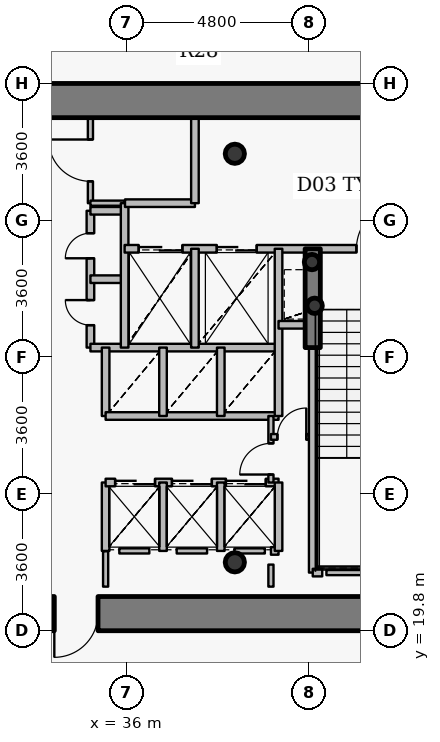
"""IFC4 building model, lengths in metres.
Left out: names, types, materials, properties, quantities, classifications, styles, units other than length and angle.
Written with IfcOpenShell. Run it as: python <this file> out.ifc"""

import sys

from ifc_helpers import new_model, si_unit, direction, frame, frame_2d, origin, origin_2d, place, context, subcontext, project, spatial, rectangle, hollow_circle, extrude, source, transform, mapped, element, fill, save


model = new_model("IFC4")
c1 = context("Model", 3, precision=1e-05, world=origin(), true_north=direction((0.0, 1.0)))
c2 = subcontext(c1, "Body", "Model", "MODEL_VIEW")
j1 = project(units=[si_unit("LENGTHUNIT", "METRE"), si_unit("PLANEANGLEUNIT", "RADIAN")], contexts=[c1])
p1 = place(None, origin())
s1 = spatial("IfcSite", under=j1, at=p1, CompositionType="ELEMENT")
p2 = place(p1, origin())
s2 = spatial("IfcBuilding", under=s1, at=p2, CompositionType="ELEMENT")
p3 = place(p2, frame((0.0, 0.0, 66.0)))
s3 = spatial("IfcBuildingStorey", under=s2, at=p3, CompositionType="ELEMENT", Elevation=66.0)
for number, where, z_axis, x_axis in (
    (1, (38.85, 21.6, 0.0), (0.0, 0.0, 1.0), (1.0, 0.0, 0.0)),
    (2, (38.85, 32.35, 0.0), (0.0, 0.0, 1.0), (1.0, 0.0, 0.0)),
):
    element("IfcColumn", number, at=place(p3, frame(where, z_axis=z_axis, x_axis=x_axis)), inside=s3, PredefinedType="COLUMN", context=c2, shape_type="SweptSolid", body=[
        extrude(hollow_circle(Radius=0.254, WallThickness=0.02, at=origin_2d()), origin(), (0.0, 0.0, 1.0), 4.2),
    ])
for number, where, z_axis, x_axis in (
    (3, (40.95, 28.35, 0.0), (0.0, 0.0, 1.0), (1.0, 0.0, 0.0)),
    (4, (40.88, 29.5, 0.0), (0.0, 0.0, 1.0), (1.0, 0.0, 0.0)),
):
    element("IfcColumn", number, at=place(p3, frame(where, z_axis=z_axis, x_axis=x_axis)), inside=s3, PredefinedType="COLUMN", context=c2, shape_type="SweptSolid", body=[
        extrude(hollow_circle(Radius=0.203, WallThickness=0.016, at=origin_2d()), origin(), (0.0, 0.0, 1.0), 4.2),
    ])
p4 = place(p3, frame((26.75, 33.75, 0.0), z_axis=(0.0, 0.0, 1.0), x_axis=(1.0, 0.0, 0.0)))
e5 = element("IfcWall", 5, at=p4, inside=s3, PredefinedType="SHEAR", context=c2, shape_type="SweptSolid", body=[
    extrude(rectangle(XDim=18.5, YDim=0.9, at=frame_2d((9.25, 0.0))), origin(), (0.0, 0.0, 1.0), 3.4),
])
p5 = place(p3, frame((45.25, 20.25, 0.0), z_axis=(0.0, 0.0, 1.0), x_axis=(-1.0, 0.0, 0.0)))
e6 = element("IfcWall", 6, at=p5, inside=s3, PredefinedType="SHEAR", context=c2, shape_type="SweptSolid", body=[
    extrude(rectangle(XDim=18.5, YDim=0.9, at=frame_2d((9.25, 0.0))), origin(), (0.0, 0.0, 1.0), 3.4),
])
p6 = place(p5, frame((10.0, 0.0, 0.0)))
e7 = element("IfcOpeningElement", 7, at=p6, cuts=e6, PredefinedType="OPENING", context=c2, shape_type="SweptSolid", body=[
    extrude(rectangle(XDim=1.15, YDim=2.15, at=origin_2d()), frame((0.575, 0.46, 1.075), z_axis=(0.0, -1.0, 0.0), x_axis=(1.0, 0.0, 0.0)), (0.0, 0.0, 1.0), 0.92),
])
p7 = place(p3, frame((40.9, 27.25, 0.0), z_axis=(0.0, 0.0, 1.0), x_axis=(0.0, 1.0, 0.0)))
e8 = element("IfcWall", 8, at=p7, inside=s3, PredefinedType="SHEAR", context=c2, shape_type="SweptSolid", body=[
    extrude(rectangle(XDim=2.6, YDim=0.4, at=frame_2d((1.3, 0.0))), origin(), (0.0, 0.0, 1.0), 3.55),
])
p8 = place(p3, frame((35.05, 27.25, 0.0), z_axis=(0.0, 0.0, 1.0), x_axis=(0.0, 1.0, 0.0)))
e9 = element("IfcWall", 9, at=p8, inside=s3, PredefinedType="PARTITIONING", context=c2, shape_type="SweptSolid", body=[
    extrude(rectangle(XDim=3.6, YDim=0.2, at=frame_2d((1.8, 0.0))), origin(), (0.0, 0.0, 1.0), 3.95),
])
p9 = place(p8, frame((0.59, 0.0, 0.0)))
e10 = element("IfcOpeningElement", 10, at=p9, cuts=e9, PredefinedType="OPENING", context=c2, shape_type="SweptSolid", body=[
    extrude(rectangle(XDim=0.66, YDim=2.05, at=origin_2d()), frame((0.33, 0.11, 1.025), z_axis=(0.0, -1.0, 0.0), x_axis=(1.0, 0.0, 0.0)), (0.0, 0.0, 1.0), 0.22),
])
p10 = place(p8, frame((2.35, 0.0, 0.0)))
e11 = element("IfcOpeningElement", 11, at=p10, cuts=e9, PredefinedType="OPENING", context=c2, shape_type="SweptSolid", body=[
    extrude(rectangle(XDim=0.66, YDim=2.05, at=origin_2d()), frame((0.33, 0.11, 1.025), z_axis=(0.0, -1.0, 0.0), x_axis=(1.0, 0.0, 0.0)), (0.0, 0.0, 1.0), 0.22),
])
p11 = place(p3, frame((35.05, 27.25, 0.0), z_axis=(0.0, 0.0, 1.0), x_axis=(1.0, 0.0, 0.0)))
e12 = element("IfcWall", 12, at=p11, inside=s3, PredefinedType="PARTITIONING", context=c2, shape_type="SweptSolid", body=[
    extrude(rectangle(XDim=4.95, YDim=0.2, at=frame_2d((2.475, 0.0))), origin(), (0.0, 0.0, 1.0), 3.535),
])
for number, where, z_axis, x_axis in (
    (13, (35.05, 29.05, 0.0), (0.0, 0.0, 1.0), (1.0, 0.0, 0.0)),
    (14, (35.05, 30.85, 0.0), (0.0, 0.0, 1.0), (1.0, 0.0, 0.0)),
):
    element("IfcWall", number, at=place(p3, frame(where, z_axis=z_axis, x_axis=x_axis)), inside=s3, PredefinedType="PARTITIONING", context=c2, shape_type="SweptSolid", body=[
        extrude(rectangle(XDim=0.9, YDim=0.2, at=frame_2d((0.45, 0.0))), origin(), (0.0, 0.0, 1.0), 3.95),
    ])
p12 = place(p3, frame((35.05, 31.05, 0.0), z_axis=(0.0, 0.0, 1.0), x_axis=(0.0, 1.0, 0.0)))
e15 = element("IfcWall", 15, at=p12, inside=s3, PredefinedType="PARTITIONING", context=c2, shape_type="SweptSolid", body=[
    extrude(rectangle(XDim=2.25, YDim=0.135, at=frame_2d((1.125, 0.0))), origin(), (0.0, 0.0, 1.0), 3.535),
])
p13 = place(p12, frame((0.575, 0.0, 0.0)))
e16 = element("IfcOpeningElement", 16, at=p13, cuts=e15, PredefinedType="OPENING", context=c2, shape_type="SweptSolid", body=[
    extrude(rectangle(XDim=1.1, YDim=2.15, at=origin_2d()), frame((0.55, 0.078, 1.075), z_axis=(0.0, -1.0, 0.0), x_axis=(1.0, 0.0, 0.0)), (0.0, 0.0, 1.0), 0.155),
])
p14 = place(p3, frame((35.05, 31.05, 0.0), z_axis=(0.0, 0.0, 1.0), x_axis=(1.0, 0.0, 0.0)))
e17 = element("IfcWall", 17, at=p14, inside=s3, PredefinedType="PARTITIONING", context=c2, shape_type="SweptSolid", body=[
    extrude(rectangle(XDim=0.9, YDim=0.135, at=frame_2d((0.45, 0.0))), origin(), (0.0, 0.0, 1.0), 3.95),
])
p15 = place(p3, frame((35.45, 21.9, 0.0), z_axis=(0.0, 0.0, 1.0), x_axis=(0.0, 1.0, 0.0)))
e18 = element("IfcWall", 18, at=p15, inside=s3, PredefinedType="PARTITIONING", context=c2, shape_type="SweptSolid", body=[
    extrude(rectangle(XDim=1.8, YDim=0.2, at=frame_2d((0.9, 0.0))), origin(), (0.0, 0.0, 1.0), 3.95),
])
p16 = place(p3, frame((35.45, 23.7, 0.0), z_axis=(0.0, 0.0, 1.0), x_axis=(1.0, 0.0, 0.0)))
e19 = element("IfcWall", 19, at=p16, inside=s3, PredefinedType="PARTITIONING", context=c2, shape_type="SweptSolid", body=[
    extrude(rectangle(XDim=4.55, YDim=0.2, at=frame_2d((2.275, 0.0))), origin(), (0.0, 0.0, 1.0), 3.535),
])
p17 = place(p16, frame((0.25, 0.0, 0.0)))
e20 = element("IfcOpeningElement", 20, at=p17, cuts=e19, PredefinedType="OPENING", context=c2, shape_type="SweptSolid", body=[
    extrude(rectangle(XDim=1.05, YDim=2.15, at=origin_2d()), frame((0.525, 0.11, 1.075), z_axis=(0.0, -1.0, 0.0), x_axis=(1.0, 0.0, 0.0)), (0.0, 0.0, 1.0), 0.22),
])
p18 = place(p16, frame((1.745, 0.0, 0.0)))
e21 = element("IfcOpeningElement", 21, at=p18, cuts=e19, PredefinedType="OPENING", context=c2, shape_type="SweptSolid", body=[
    extrude(rectangle(XDim=1.05, YDim=2.15, at=origin_2d()), frame((0.525, 0.11, 1.075), z_axis=(0.0, -1.0, 0.0), x_axis=(1.0, 0.0, 0.0)), (0.0, 0.0, 1.0), 0.22),
])
p19 = place(p16, frame((3.165, 0.0, 0.0)))
e22 = element("IfcOpeningElement", 22, at=p19, cuts=e19, PredefinedType="OPENING", context=c2, shape_type="SweptSolid", body=[
    extrude(rectangle(XDim=1.05, YDim=2.15, at=origin_2d()), frame((0.525, 0.11, 1.075), z_axis=(0.0, -1.0, 0.0), x_axis=(1.0, 0.0, 0.0)), (0.0, 0.0, 1.0), 0.22),
])
p20 = place(p3, frame((35.45, 25.45, 0.0), z_axis=(0.0, 0.0, 1.0), x_axis=(0.0, 1.0, 0.0)))
e23 = element("IfcWall", 23, at=p20, inside=s3, PredefinedType="PARTITIONING", context=c2, shape_type="SweptSolid", body=[
    extrude(rectangle(XDim=1.8, YDim=0.2, at=frame_2d((0.9, 0.0))), origin(), (0.0, 0.0, 1.0), 3.95),
])
p21 = place(p3, frame((35.45, 25.45, 0.0), z_axis=(0.0, 0.0, 1.0), x_axis=(1.0, 0.0, 0.0)))
e24 = element("IfcWall", 24, at=p21, inside=s3, PredefinedType="PARTITIONING", context=c2, shape_type="SweptSolid", body=[
    extrude(rectangle(XDim=4.55, YDim=0.2, at=frame_2d((2.275, 0.0))), origin(), (0.0, 0.0, 1.0), 3.535),
])
p22 = place(p3, frame((35.95, 27.25, 0.0), z_axis=(0.0, 0.0, 1.0), x_axis=(0.0, 1.0, 0.0)))
e25 = element("IfcWall", 25, at=p22, inside=s3, PredefinedType="PARTITIONING", context=c2, shape_type="SweptSolid", body=[
    extrude(rectangle(XDim=3.8, YDim=0.2, at=frame_2d((1.9, 0.0))), origin(), (0.0, 0.0, 1.0), 3.95),
])
p23 = place(p3, frame((35.95, 29.85, 0.0), z_axis=(0.0, 0.0, 1.0), x_axis=(1.0, 0.0, 0.0)))
e26 = element("IfcWall", 26, at=p23, inside=s3, PredefinedType="PARTITIONING", context=c2, shape_type="SweptSolid", body=[
    extrude(rectangle(XDim=8.49, YDim=0.2, at=frame_2d((4.245, 0.0))), origin(), (0.0, 0.0, 1.0), 3.535),
])
p24 = place(p23, frame((6.1, 0.0, 0.0)))
e27 = element("IfcOpeningElement", 27, at=p24, cuts=e26, PredefinedType="OPENING", context=c2, shape_type="SweptSolid", body=[
    extrude(rectangle(XDim=1.2, YDim=2.15, at=origin_2d()), frame((0.6, 0.11, 1.075), z_axis=(0.0, -1.0, 0.0), x_axis=(1.0, 0.0, 0.0)), (0.0, 0.0, 1.0), 0.22),
])
p25 = place(p23, frame((0.37, 0.0, 0.0)))
e28 = element("IfcOpeningElement", 28, at=p25, cuts=e26, PredefinedType="OPENING", context=c2, shape_type="SweptSolid", body=[
    extrude(rectangle(XDim=1.15, YDim=2.15, at=origin_2d()), frame((0.575, 0.11, 1.075), z_axis=(0.0, -1.0, 0.0), x_axis=(1.0, 0.0, 0.0)), (0.0, 0.0, 1.0), 0.22),
])
p26 = place(p23, frame((2.425, 0.0, 0.0)))
e29 = element("IfcOpeningElement", 29, at=p26, cuts=e26, PredefinedType="OPENING", context=c2, shape_type="SweptSolid", body=[
    extrude(rectangle(XDim=1.05, YDim=2.15, at=origin_2d()), frame((0.525, 0.11, 1.075), z_axis=(0.0, -1.0, 0.0), x_axis=(1.0, 0.0, 0.0)), (0.0, 0.0, 1.0), 0.22),
])
p27 = place(p3, frame((35.96, 31.05, 0.0), z_axis=(0.0, 0.0, 1.0), x_axis=(1.0, 0.0, 0.0)))
e30 = element("IfcWall", 30, at=p27, inside=s3, PredefinedType="PARTITIONING", context=c2, shape_type="SweptSolid", body=[
    extrude(rectangle(XDim=1.84, YDim=0.2, at=frame_2d((0.92, 0.0))), origin(), (0.0, 0.0, 1.0), 3.95),
])
for number, where, z_axis, x_axis in (
    (31, (36.96, 21.9, 0.0), (0.0, 0.0, 1.0), (0.0, 1.0, 0.0)),
    (32, (36.96, 25.45, 0.0), (0.0, 0.0, 1.0), (0.0, 1.0, 0.0)),
):
    element("IfcWall", number, at=place(p3, frame(where, z_axis=z_axis, x_axis=x_axis)), inside=s3, PredefinedType="PARTITIONING", context=c2, shape_type="SweptSolid", body=[
        extrude(rectangle(XDim=1.8, YDim=0.2, at=frame_2d((0.9, 0.0))), origin(), (0.0, 0.0, 1.0), 3.95),
    ])
p28 = place(p3, frame((37.8, 27.25, 0.0), z_axis=(0.0, 0.0, 1.0), x_axis=(0.0, 1.0, 0.0)))
e33 = element("IfcWall", 33, at=p28, inside=s3, PredefinedType="PARTITIONING", context=c2, shape_type="SweptSolid", body=[
    extrude(rectangle(XDim=2.6, YDim=0.2, at=frame_2d((1.3, 0.0))), origin(), (0.0, 0.0, 1.0), 3.95),
])
p29 = place(p3, frame((37.8, 31.05, 0.0), z_axis=(0.0, 0.0, 1.0), x_axis=(0.0, 1.0, 0.0)))
e34 = element("IfcWall", 34, at=p29, inside=s3, PredefinedType="PARTITIONING", context=c2, shape_type="SweptSolid", body=[
    extrude(rectangle(XDim=2.25, YDim=0.2, at=frame_2d((1.125, 0.0))), origin(), (0.0, 0.0, 1.0), 3.535),
])
for number, where, z_axis, x_axis in (
    (35, (38.48, 21.9, 0.0), (0.0, 0.0, 1.0), (0.0, 1.0, 0.0)),
    (36, (38.48, 25.45, 0.0), (0.0, 0.0, 1.0), (0.0, 1.0, 0.0)),
):
    element("IfcWall", number, at=place(p3, frame(where, z_axis=z_axis, x_axis=x_axis)), inside=s3, PredefinedType="PARTITIONING", context=c2, shape_type="SweptSolid", body=[
        extrude(rectangle(XDim=1.8, YDim=0.2, at=frame_2d((0.9, 0.0))), origin(), (0.0, 0.0, 1.0), 3.95),
    ])
p30 = place(p3, frame((39.8, 21.9, 0.0), z_axis=(0.0, 0.0, 1.0), x_axis=(1.0, 0.0, 0.0)))
e37 = element("IfcWall", 37, at=p30, inside=s3, PredefinedType="PARTITIONING", context=c2, shape_type="SweptSolid", body=[
    extrude(rectangle(XDim=0.2, YDim=0.2, at=frame_2d((0.1, 0.0))), origin(), (0.0, 0.0, 1.0), 3.95),
])
p31 = place(p3, frame((39.8, 23.7, 0.0), z_axis=(0.0, 0.0, 1.0), x_axis=(0.0, 1.0, 0.0)))
e38 = element("IfcWall", 38, at=p31, inside=s3, PredefinedType="PARTITIONING", context=c2, shape_type="SweptSolid", body=[
    extrude(rectangle(XDim=1.75, YDim=0.135, at=frame_2d((0.875, 0.0))), origin(), (0.0, 0.0, 1.0), 3.95),
])
p32 = place(p31, frame((0.21, 0.0, 0.0)))
e39 = element("IfcOpeningElement", 39, at=p32, cuts=e38, PredefinedType="OPENING", context=c2, shape_type="SweptSolid", body=[
    extrude(rectangle(XDim=0.82, YDim=2.1, at=origin_2d()), frame((0.41, 0.078, 1.05), z_axis=(0.0, -1.0, 0.0), x_axis=(1.0, 0.0, 0.0)), (0.0, 0.0, 1.0), 0.155),
])
p33 = place(p3, frame((39.8, 24.9, 0.0), z_axis=(0.0, 0.0, 1.0), x_axis=(1.0, 0.0, 0.0)))
e40 = element("IfcWall", 40, at=p33, inside=s3, PredefinedType="PARTITIONING", context=c2, shape_type="SweptSolid", body=[
    extrude(rectangle(XDim=1.1, YDim=0.15, at=frame_2d((0.55, 0.0))), origin(), (0.0, 0.0, 1.0), 3.95),
])
p34 = place(p33, frame((0.17, 0.0, 0.0)))
e41 = element("IfcOpeningElement", 41, at=p34, cuts=e40, PredefinedType="OPENING", context=c2, shape_type="SweptSolid", body=[
    extrude(rectangle(XDim=0.76, YDim=2.1, at=origin_2d()), frame((0.38, 0.085, 1.05), z_axis=(0.0, -1.0, 0.0), x_axis=(1.0, 0.0, 0.0)), (0.0, 0.0, 1.0), 0.17),
])
p35 = place(p3, frame((40.0, 21.9, 0.0), z_axis=(0.0, 0.0, 1.0), x_axis=(0.0, 1.0, 0.0)))
e42 = element("IfcWall", 42, at=p35, inside=s3, PredefinedType="PARTITIONING", context=c2, shape_type="SweptSolid", body=[
    extrude(rectangle(XDim=1.8, YDim=0.2, at=frame_2d((0.9, 0.0))), origin(), (0.0, 0.0, 1.0), 3.95),
])
p36 = place(p3, frame((40.0, 25.45, 0.0), z_axis=(0.0, 0.0, 1.0), x_axis=(0.0, 1.0, 0.0)))
e43 = element("IfcWall", 43, at=p36, inside=s3, PredefinedType="PARTITIONING", context=c2, shape_type="SweptSolid", body=[
    extrude(rectangle(XDim=4.4, YDim=0.2, at=frame_2d((2.2, 0.0))), origin(), (0.0, 0.0, 1.0), 3.95),
])
p37 = place(p3, frame((40.0, 27.85, 0.0), z_axis=(0.0, 0.0, 1.0), x_axis=(1.0, 0.0, 0.0)))
e44 = element("IfcWall", 44, at=p37, inside=s3, PredefinedType="PARTITIONING", context=c2, shape_type="SweptSolid", body=[
    extrude(rectangle(XDim=0.9, YDim=0.2, at=frame_2d((0.45, 0.0))), origin(), (0.0, 0.0, 1.0), 3.95),
])
p38 = place(p3, frame((40.9, 21.33, 0.0), z_axis=(0.0, 0.0, 1.0), x_axis=(0.0, 1.0, 0.0)))
e45 = element("IfcWall", 45, at=p38, inside=s3, PredefinedType="PARTITIONING", context=c2, shape_type="SweptSolid", body=[
    extrude(rectangle(XDim=5.91, YDim=0.2, at=frame_2d((2.955, 0.0))), origin(), (0.0, 0.0, 1.0), 3.485),
])
p39 = place(p3, frame((40.9, 21.33, 0.0), z_axis=(0.0, 0.0, 1.0), x_axis=(1.0, 0.0, 0.0)))
e46 = element("IfcWall", 46, at=p39, inside=s3, PredefinedType="PARTITIONING", context=c2, shape_type="SweptSolid", body=[
    extrude(rectangle(XDim=0.25, YDim=0.2, at=frame_2d((0.125, 0.0))), origin(), (0.0, 0.0, 1.0), 3.485),
])
p40 = place(p3, frame((44.08, 21.33, 0.0), z_axis=(0.0, 0.0, 1.0), x_axis=(-1.0, 0.0, 0.0)))
e47 = element("IfcWall", 47, at=p40, inside=s3, PredefinedType="PARTITIONING", context=c2, shape_type="SweptSolid", body=[
    extrude(rectangle(XDim=2.82, YDim=0.135, at=frame_2d((1.41, 0.0))), origin(), (0.0, 0.0, 1.0), 3.485),
])
p41 = place(p3, frame((36.6, 21.9, 0.0), z_axis=(0.0, 0.0, 1.0), x_axis=(-1.0, 0.0, 0.0)))
e48 = element("IfcWall", 48, at=p41, inside=s3, PredefinedType="PARTITIONING", context=c2, shape_type="SweptSolid", body=[
    extrude(rectangle(XDim=0.79, YDim=0.135, at=frame_2d((0.395, 0.0))), origin(), (0.0, 0.0, 1.0), 3.95),
])
p42 = place(p3, frame((38.12, 21.9, 0.0), z_axis=(0.0, 0.0, 1.0), x_axis=(-1.0, 0.0, 0.0)))
e49 = element("IfcWall", 49, at=p42, inside=s3, PredefinedType="PARTITIONING", context=c2, shape_type="SweptSolid", body=[
    extrude(rectangle(XDim=0.8, YDim=0.135, at=frame_2d((0.4, 0.0))), origin(), (0.0, 0.0, 1.0), 3.95),
])
p43 = place(p3, frame((39.64, 21.9, 0.0), z_axis=(0.0, 0.0, 1.0), x_axis=(-1.0, 0.0, 0.0)))
e50 = element("IfcWall", 50, at=p43, inside=s3, PredefinedType="PARTITIONING", context=c2, shape_type="SweptSolid", body=[
    extrude(rectangle(XDim=0.8, YDim=0.135, at=frame_2d((0.4, 0.0))), origin(), (0.0, 0.0, 1.0), 3.535),
])
p44 = place(p3, frame((39.8, 20.96, 0.0), z_axis=(0.0, 0.0, 1.0), x_axis=(0.0, 1.0, 0.0)))
e51 = element("IfcWall", 51, at=p44, inside=s3, PredefinedType="PARTITIONING", context=c2, shape_type="SweptSolid", body=[
    extrude(rectangle(XDim=0.58, YDim=0.135, at=frame_2d((0.29, 0.0))), origin(), (0.0, 0.0, 1.0), 3.485),
])
p45 = place(p3, frame((35.45, 21.89, 0.0), z_axis=(0.0, 0.0, 1.0), x_axis=(0.0, -1.0, 0.0)))
e52 = element("IfcWall", 52, at=p45, inside=s3, PredefinedType="PARTITIONING", context=c2, shape_type="SweptSolid", body=[
    extrude(rectangle(XDim=0.93, YDim=0.135, at=frame_2d((0.465, 0.0))), origin(), (0.0, 0.0, 1.0), 3.535),
])
m1 = source(origin(), c2, "Body", "SweptSolid", [
    extrude(rectangle(XDim=1.15, YDim=2.15, at=origin_2d()), frame((0.575, 0.025, 1.075), z_axis=(0.0, -1.0, 0.0), x_axis=(1.0, 0.0, 0.0)), (0.0, 0.0, 1.0), 0.05),
])
p46 = place(p6, origin())
e53 = element("IfcDoor", 53, at=p46, inside=s3, OperationType="SINGLE_SWING_RIGHT", PredefinedType="DOOR", context=c2, shape_type="MappedRepresentation", body=[
    mapped(m1, transform((0.0, 0.0, 0.0), x_axis=(1.0, 0.0, 0.0), y_axis=(0.0, 1.0, 0.0), z_axis=(0.0, 0.0, 1.0), scale=1.0)),
])
fill(e7, e53)
m2 = source(origin(), c2, "Body", "SweptSolid", [
    extrude(rectangle(XDim=1.2, YDim=2.15, at=origin_2d()), frame((0.6, 0.025, 1.075), z_axis=(0.0, -1.0, 0.0), x_axis=(1.0, 0.0, 0.0)), (0.0, 0.0, 1.0), 0.05),
])
p47 = place(p24, origin())
e54 = element("IfcDoor", 54, at=p47, inside=s3, OperationType="SINGLE_SWING_RIGHT", PredefinedType="DOOR", context=c2, shape_type="MappedRepresentation", body=[
    mapped(m2, transform((0.0, 0.0, 0.0), x_axis=(1.0, 0.0, 0.0), y_axis=(0.0, 1.0, 0.0), z_axis=(0.0, 0.0, 1.0), scale=1.0)),
])
fill(e27, e54)
m3 = source(origin(), c2, "Body", "SweptSolid", [
    extrude(rectangle(XDim=1.15, YDim=2.15, at=origin_2d()), frame((0.575, 0.025, 1.075), z_axis=(0.0, -1.0, 0.0), x_axis=(1.0, 0.0, 0.0)), (0.0, 0.0, 1.0), 0.05),
])
p48 = place(p25, origin())
e55 = element("IfcDoor", 55, at=p48, inside=s3, OperationType="DOUBLE_DOOR_SLIDING", PredefinedType="USERDEFINED", context=c2, shape_type="MappedRepresentation", body=[
    mapped(m3, transform((0.0, 0.0, 0.0), x_axis=(1.0, 0.0, 0.0), y_axis=(0.0, 1.0, 0.0), z_axis=(0.0, 0.0, 1.0), scale=1.0)),
])
fill(e28, e55)
m4 = source(origin(), c2, "Body", "SweptSolid", [
    extrude(rectangle(XDim=1.05, YDim=2.15, at=origin_2d()), frame((0.525, 0.025, 1.075), z_axis=(0.0, -1.0, 0.0), x_axis=(1.0, 0.0, 0.0)), (0.0, 0.0, 1.0), 0.05),
])
p49 = place(p26, origin())
e56 = element("IfcDoor", 56, at=p49, inside=s3, OperationType="DOUBLE_DOOR_SLIDING", PredefinedType="USERDEFINED", context=c2, shape_type="MappedRepresentation", body=[
    mapped(m4, transform((0.0, 0.0, 0.0), x_axis=(1.0, 0.0, 0.0), y_axis=(0.0, 1.0, 0.0), z_axis=(0.0, 0.0, 1.0), scale=1.0)),
])
fill(e29, e56)
p50 = place(p17, origin())
e57 = element("IfcDoor", 57, at=p50, inside=s3, OperationType="DOUBLE_DOOR_SLIDING", PredefinedType="USERDEFINED", context=c2, shape_type="MappedRepresentation", body=[
    mapped(m4, transform((0.0, 0.0, 0.0), x_axis=(1.0, 0.0, 0.0), y_axis=(0.0, 1.0, 0.0), z_axis=(0.0, 0.0, 1.0), scale=1.0)),
])
fill(e20, e57)
p51 = place(p18, origin())
e58 = element("IfcDoor", 58, at=p51, inside=s3, OperationType="DOUBLE_DOOR_SLIDING", PredefinedType="USERDEFINED", context=c2, shape_type="MappedRepresentation", body=[
    mapped(m4, transform((0.0, 0.0, 0.0), x_axis=(1.0, 0.0, 0.0), y_axis=(0.0, 1.0, 0.0), z_axis=(0.0, 0.0, 1.0), scale=1.0)),
])
fill(e21, e58)
p52 = place(p19, origin())
e59 = element("IfcDoor", 59, at=p52, inside=s3, OperationType="DOUBLE_DOOR_SLIDING", PredefinedType="USERDEFINED", context=c2, shape_type="MappedRepresentation", body=[
    mapped(m4, transform((0.0, 0.0, 0.0), x_axis=(1.0, 0.0, 0.0), y_axis=(0.0, 1.0, 0.0), z_axis=(0.0, 0.0, 1.0), scale=1.0)),
])
fill(e22, e59)
m5 = source(origin(), c2, "Body", "SweptSolid", [
    extrude(rectangle(XDim=0.66, YDim=2.05, at=origin_2d()), frame((0.33, 0.025, 1.025), z_axis=(0.0, -1.0, 0.0), x_axis=(1.0, 0.0, 0.0)), (0.0, 0.0, 1.0), 0.05),
])
p53 = place(p9, origin())
e60 = element("IfcDoor", 60, at=p53, inside=s3, OperationType="SINGLE_SWING_RIGHT", PredefinedType="USERDEFINED", context=c2, shape_type="MappedRepresentation", body=[
    mapped(m5, transform((0.0, 0.0, 0.0), x_axis=(1.0, 0.0, 0.0), y_axis=(0.0, 1.0, 0.0), z_axis=(0.0, 0.0, 1.0), scale=1.0)),
])
fill(e10, e60)
p54 = place(p10, origin())
e61 = element("IfcDoor", 61, at=p54, inside=s3, OperationType="SINGLE_SWING_LEFT", PredefinedType="USERDEFINED", context=c2, shape_type="MappedRepresentation", body=[
    mapped(m5, transform((0.0, 0.0, 0.0), x_axis=(1.0, 0.0, 0.0), y_axis=(0.0, 1.0, 0.0), z_axis=(0.0, 0.0, 1.0), scale=1.0)),
])
fill(e11, e61)
m6 = source(origin(), c2, "Body", "SweptSolid", [
    extrude(rectangle(XDim=1.1, YDim=2.15, at=origin_2d()), frame((0.55, 0.025, 1.075), z_axis=(0.0, -1.0, 0.0), x_axis=(1.0, 0.0, 0.0)), (0.0, 0.0, 1.0), 0.05),
])
p55 = place(p13, origin())
e62 = element("IfcDoor", 62, at=p55, inside=s3, OperationType="SINGLE_SWING_RIGHT", PredefinedType="DOOR", context=c2, shape_type="MappedRepresentation", body=[
    mapped(m6, transform((0.0, 0.0, 0.0), x_axis=(1.0, 0.0, 0.0), y_axis=(0.0, 1.0, 0.0), z_axis=(0.0, 0.0, 1.0), scale=1.0)),
])
fill(e16, e62)
m7 = source(origin(), c2, "Body", "SweptSolid", [
    extrude(rectangle(XDim=0.82, YDim=2.1, at=origin_2d()), frame((0.41, 0.025, 1.05), z_axis=(0.0, -1.0, 0.0), x_axis=(1.0, 0.0, 0.0)), (0.0, 0.0, 1.0), 0.05),
])
p56 = place(p32, origin())
e63 = element("IfcDoor", 63, at=p56, inside=s3, OperationType="SINGLE_SWING_LEFT", PredefinedType="DOOR", context=c2, shape_type="MappedRepresentation", body=[
    mapped(m7, transform((0.0, 0.0, 0.0), x_axis=(1.0, 0.0, 0.0), y_axis=(0.0, 1.0, 0.0), z_axis=(0.0, 0.0, 1.0), scale=1.0)),
])
fill(e39, e63)
m8 = source(origin(), c2, "Body", "SweptSolid", [
    extrude(rectangle(XDim=0.76, YDim=2.1, at=origin_2d()), frame((0.38, 0.025, 1.05), z_axis=(0.0, -1.0, 0.0), x_axis=(1.0, 0.0, 0.0)), (0.0, 0.0, 1.0), 0.05),
])
p57 = place(p34, origin())
e64 = element("IfcDoor", 64, at=p57, inside=s3, OperationType="SINGLE_SWING_RIGHT", PredefinedType="DOOR", context=c2, shape_type="MappedRepresentation", body=[
    mapped(m8, transform((0.0, 0.0, 0.0), x_axis=(1.0, 0.0, 0.0), y_axis=(0.0, 1.0, 0.0), z_axis=(0.0, 0.0, 1.0), scale=1.0)),
])
fill(e41, e64)
save(model, sys.argv[1])
